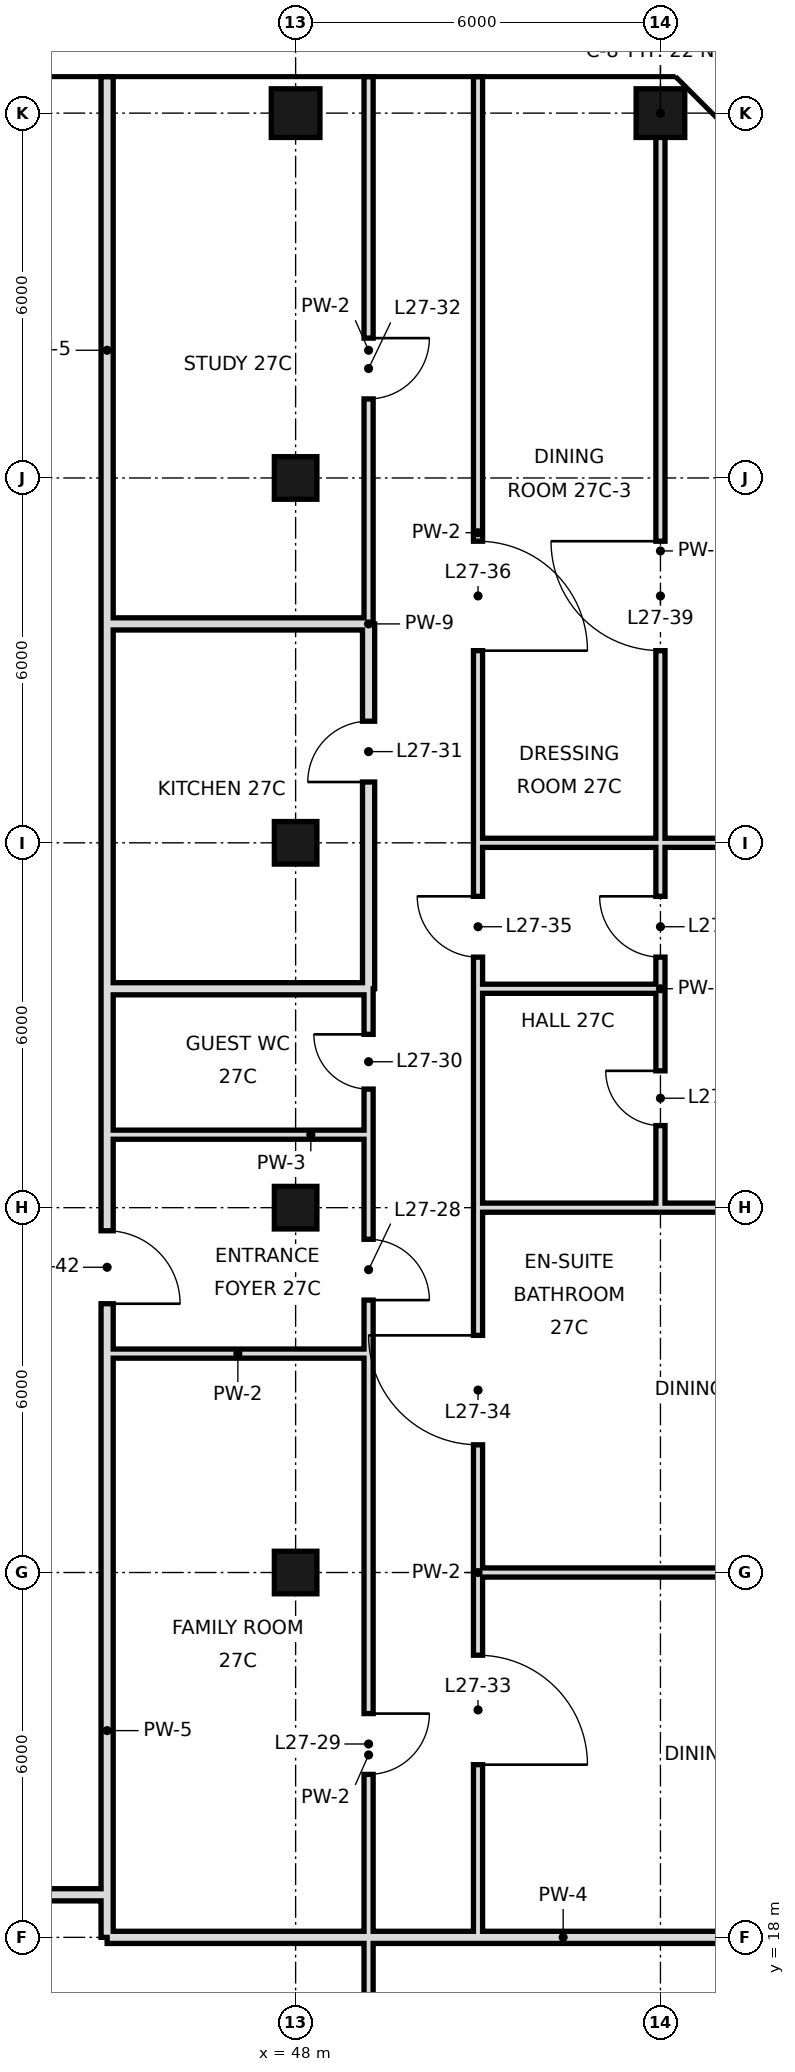
"""IFC4 building model, lengths in metres.
Left out: names, types, materials, properties, quantities, classifications, styles, units other than length and angle.
Written with IfcOpenShell. Run it as: python <this file> out.ifc"""

import sys

from ifc_helpers import new_model, si_unit, direction, frame, frame_2d, origin, origin_2d, place, context, subcontext, project, spatial, rectangle, hollow_rectangle, extrude, element, fill, save


model = new_model("IFC4")
c1 = context("Model", 3, precision=1e-05, world=origin(), true_north=direction((0.0, 1.0)))
c2 = subcontext(c1, "Body", "Model", "MODEL_VIEW")
j1 = project(units=[si_unit("LENGTHUNIT", "METRE"), si_unit("PLANEANGLEUNIT", "RADIAN")], contexts=[c1])
p1 = place(None, origin())
s1 = spatial("IfcSite", under=j1, at=p1, CompositionType="ELEMENT")
p2 = place(p1, origin())
s2 = spatial("IfcBuilding", under=s1, at=p2, CompositionType="ELEMENT")
p3 = place(p2, frame((0.0, 0.0, 123.2)))
s3 = spatial("IfcBuildingStorey", under=s2, at=p3, CompositionType="ELEMENT", Elevation=123.2)
for number, where, z_axis, x_axis in (
    (1, (48.0, 24.0, 0.0), (0.0, 0.0, 1.0), (1.0, 0.0, 0.0)),
    (2, (48.0, 30.0, 0.0), (0.0, 0.0, 1.0), (1.0, 0.0, 0.0)),
    (3, (48.0, 36.0, 0.0), (0.0, 0.0, 1.0), (1.0, 0.0, 0.0)),
    (4, (48.0, 42.0, 0.0), (0.0, 0.0, 1.0), (1.0, 0.0, 0.0)),
):
    element("IfcColumn", number, at=place(p3, frame(where, z_axis=z_axis, x_axis=x_axis)), inside=s3, PredefinedType="COLUMN", context=c2, shape_type="SweptSolid", body=[
        extrude(hollow_rectangle(XDim=0.7, YDim=0.7, WallThickness=0.036, at=origin_2d()), origin(), (0.0, 0.0, 1.0), 3.6),
    ])
for number, where, z_axis, x_axis in (
    (5, (48.0, 48.0, 0.0), (0.0, 0.0, 1.0), (1.0, 0.0, 0.0)),
    (6, (54.0, 48.0, 0.0), (0.0, 0.0, 1.0), (1.0, 0.0, 0.0)),
):
    element("IfcColumn", number, at=place(p3, frame(where, z_axis=z_axis, x_axis=x_axis)), inside=s3, PredefinedType="COLUMN", context=c2, shape_type="SweptSolid", body=[
        extrude(hollow_rectangle(XDim=0.8, YDim=0.8, WallThickness=0.04, at=origin_2d()), origin(), (0.0, 0.0, 1.0), 3.6),
    ])
p4 = place(p3, frame((44.9, 18.7, 0.0), z_axis=(0.0, 0.0, 1.0), x_axis=(0.0, 1.0, 0.0)))
e7 = element("IfcWall", 7, at=p4, inside=s3, PredefinedType="SOLIDWALL", context=c2, shape_type="SweptSolid", body=[
    extrude(rectangle(XDim=14.9, YDim=0.2, at=frame_2d((7.45, 0.0))), origin(), (0.0, 0.0, 1.0), 2.97),
])
p5 = place(p4, frame((9.72, 0.0, 0.0)))
e8 = element("IfcOpeningElement", 8, at=p5, cuts=e7, PredefinedType="OPENING", context=c2, shape_type="SweptSolid", body=[
    extrude(rectangle(XDim=1.2, YDim=2.4, at=frame_2d((0.6, 1.2))), frame((0.0, 0.11, 0.0), z_axis=(0.0, -1.0, 0.0), x_axis=(1.0, 0.0, 0.0)), (0.0, 0.0, 1.0), 0.22),
])
p6 = place(p3, frame((44.9, 39.6, 0.0), z_axis=(0.0, 0.0, 1.0), x_axis=(0.0, 1.0, 0.0)))
e9 = element("IfcWall", 9, at=p6, inside=s3, PredefinedType="SOLIDWALL", context=c2, shape_type="SweptSolid", body=[
    extrude(rectangle(XDim=9.0, YDim=0.2, at=frame_2d((4.5, 0.0))), origin(), (0.0, 0.0, 1.0), 2.72),
])
p7 = place(p3, frame((44.9, 33.6, 0.0), z_axis=(0.0, 0.0, 1.0), x_axis=(0.0, 1.0, 0.0)))
e10 = element("IfcWall", 10, at=p7, inside=s3, PredefinedType="SOLIDWALL", context=c2, shape_type="SweptSolid", body=[
    extrude(rectangle(XDim=6.0, YDim=0.2, at=frame_2d((3.0, 0.0))), origin(), (0.0, 0.0, 1.0), 3.42),
])
p8 = place(p3, frame((44.9, 18.0, 0.0), z_axis=(0.0, 0.0, 1.0), x_axis=(0.0, 1.0, 0.0)))
e11 = element("IfcWall", 11, at=p8, inside=s3, PredefinedType="SOLIDWALL", context=c2, shape_type="SweptSolid", body=[
    extrude(rectangle(XDim=0.7, YDim=0.2, at=frame_2d((0.35, 0.0))), origin(), (0.0, 0.0, 1.0), 2.97),
])
p9 = place(p3, frame((49.2, 33.6, 0.0), z_axis=(0.0, 0.0, 1.0), x_axis=(0.0, 1.0, 0.0)))
e12 = element("IfcWall", 12, at=p9, inside=s3, PredefinedType="SOLIDWALL", context=c2, shape_type="SweptSolid", body=[
    extrude(rectangle(XDim=6.0, YDim=0.2, at=frame_2d((3.0, 0.0))), origin(), (0.0, 0.0, 1.0), 2.72),
])
p10 = place(p9, frame((3.4, 0.0, 0.0)))
e13 = element("IfcOpeningElement", 13, at=p10, cuts=e12, PredefinedType="OPENING", context=c2, shape_type="SweptSolid", body=[
    extrude(rectangle(XDim=1.0, YDim=2.4, at=frame_2d((0.5, 1.2))), frame((0.0, 0.11, 0.0), z_axis=(0.0, -1.0, 0.0), x_axis=(1.0, 0.0, 0.0)), (0.0, 0.0, 1.0), 0.22),
])
p11 = place(p3, frame((49.2, 10.8, 0.0), z_axis=(0.0, 0.0, 1.0), x_axis=(0.0, 1.0, 0.0)))
e14 = element("IfcWall", 14, at=p11, inside=s3, PredefinedType="PARTITIONING", context=c2, shape_type="SweptSolid", body=[
    extrude(rectangle(XDim=20.4, YDim=0.15, at=frame_2d((10.2, 0.0))), origin(), (0.0, 0.0, 1.0), 3.42),
])
p12 = place(p11, frame((17.68, 0.0, 0.0)))
e15 = element("IfcOpeningElement", 15, at=p12, cuts=e14, PredefinedType="OPENING", context=c2, shape_type="SweptSolid", body=[
    extrude(rectangle(XDim=1.0, YDim=2.4, at=frame_2d((0.5, 1.2))), frame((0.0, 0.085, 0.0), z_axis=(0.0, -1.0, 0.0), x_axis=(1.0, 0.0, 0.0)), (0.0, 0.0, 1.0), 0.17),
])
p13 = place(p11, frame((9.88, 0.0, 0.0)))
e16 = element("IfcOpeningElement", 16, at=p13, cuts=e14, PredefinedType="OPENING", context=c2, shape_type="SweptSolid", body=[
    extrude(rectangle(XDim=1.0, YDim=2.4, at=frame_2d((0.5, 1.2))), frame((0.0, 0.085, 0.0), z_axis=(0.0, -1.0, 0.0), x_axis=(1.0, 0.0, 0.0)), (0.0, 0.0, 1.0), 0.17),
])
p14 = place(p3, frame((49.2, 39.6, 0.0), z_axis=(0.0, 0.0, 1.0), x_axis=(0.0, 1.0, 0.0)))
e17 = element("IfcWall", 17, at=p14, inside=s3, PredefinedType="PARTITIONING", context=c2, shape_type="SweptSolid", body=[
    extrude(rectangle(XDim=9.0, YDim=0.15, at=frame_2d((4.5, 0.0))), origin(), (0.0, 0.0, 1.0), 3.42),
])
p15 = place(p14, frame((3.7, 0.0, 0.0)))
e18 = element("IfcOpeningElement", 18, at=p15, cuts=e17, PredefinedType="OPENING", context=c2, shape_type="SweptSolid", body=[
    extrude(rectangle(XDim=1.0, YDim=2.4, at=frame_2d((0.5, 1.2))), frame((0.0, 0.085, 0.0), z_axis=(0.0, -1.0, 0.0), x_axis=(1.0, 0.0, 0.0)), (0.0, 0.0, 1.0), 0.17),
])
p16 = place(p3, frame((49.2, 31.2, 0.0), z_axis=(0.0, 0.0, 1.0), x_axis=(0.0, 1.0, 0.0)))
e19 = element("IfcWall", 19, at=p16, inside=s3, PredefinedType="PARTITIONING", context=c2, shape_type="SweptSolid", body=[
    extrude(rectangle(XDim=2.4, YDim=0.15, at=frame_2d((1.2, 0.0))), origin(), (0.0, 0.0, 1.0), 3.42),
])
p17 = place(p16, frame((0.75, 0.0, 0.0)))
e20 = element("IfcOpeningElement", 20, at=p17, cuts=e19, PredefinedType="OPENING", context=c2, shape_type="SweptSolid", body=[
    extrude(rectangle(XDim=0.9, YDim=2.4, at=frame_2d((0.45, 1.2))), frame((0.0, 0.085, 0.0), z_axis=(0.0, -1.0, 0.0), x_axis=(1.0, 0.0, 0.0)), (0.0, 0.0, 1.0), 0.17),
])
p18 = place(p3, frame((51.0, 18.0, 0.0), z_axis=(0.0, 0.0, 1.0), x_axis=(0.0, 1.0, 0.0)))
e21 = element("IfcWall", 21, at=p18, inside=s3, PredefinedType="PARTITIONING", context=c2, shape_type="SweptSolid", body=[
    extrude(rectangle(XDim=12.0, YDim=0.15, at=frame_2d((6.0, 0.0))), origin(), (0.0, 0.0, 1.0), 3.42),
])
p19 = place(p18, frame((2.84, 0.0, 0.0)))
e22 = element("IfcOpeningElement", 22, at=p19, cuts=e21, PredefinedType="OPENING", context=c2, shape_type="SweptSolid", body=[
    extrude(rectangle(XDim=1.8, YDim=2.4, at=frame_2d((0.9, 1.2))), frame((0.0, 0.085, 0.0), z_axis=(0.0, -1.0, 0.0), x_axis=(1.0, 0.0, 0.0)), (0.0, 0.0, 1.0), 0.17),
])
p20 = place(p18, frame((8.1, 0.0, 0.0)))
e23 = element("IfcOpeningElement", 23, at=p20, cuts=e21, PredefinedType="OPENING", context=c2, shape_type="SweptSolid", body=[
    extrude(rectangle(XDim=1.8, YDim=2.4, at=frame_2d((0.9, 1.2))), frame((0.0, 0.085, 0.0), z_axis=(0.0, -1.0, 0.0), x_axis=(1.0, 0.0, 0.0)), (0.0, 0.0, 1.0), 0.17),
])
p21 = place(p3, frame((51.0, 33.6, 0.0), z_axis=(0.0, 0.0, 1.0), x_axis=(0.0, 1.0, 0.0)))
e24 = element("IfcWall", 24, at=p21, inside=s3, PredefinedType="PARTITIONING", context=c2, shape_type="SweptSolid", body=[
    extrude(rectangle(XDim=15.0, YDim=0.15, at=frame_2d((7.5, 0.0))), origin(), (0.0, 0.0, 1.0), 3.42),
])
p22 = place(p21, frame((0.52, 0.0, 0.0)))
e25 = element("IfcOpeningElement", 25, at=p22, cuts=e24, PredefinedType="OPENING", context=c2, shape_type="SweptSolid", body=[
    extrude(rectangle(XDim=1.0, YDim=2.4, at=frame_2d((0.5, 1.2))), frame((0.0, 0.085, 0.0), z_axis=(0.0, -1.0, 0.0), x_axis=(1.0, 0.0, 0.0)), (0.0, 0.0, 1.0), 0.17),
])
p23 = place(p21, frame((5.56, 0.0, 0.0)))
e26 = element("IfcOpeningElement", 26, at=p23, cuts=e24, PredefinedType="OPENING", context=c2, shape_type="SweptSolid", body=[
    extrude(rectangle(XDim=1.8, YDim=2.4, at=frame_2d((0.9, 1.2))), frame((0.0, 0.085, 0.0), z_axis=(0.0, -1.0, 0.0), x_axis=(1.0, 0.0, 0.0)), (0.0, 0.0, 1.0), 0.17),
])
p24 = place(p3, frame((51.0, 30.0, 0.0), z_axis=(0.0, 0.0, 1.0), x_axis=(0.0, 1.0, 0.0)))
e27 = element("IfcWall", 27, at=p24, inside=s3, PredefinedType="PARTITIONING", context=c2, shape_type="SweptSolid", body=[
    extrude(rectangle(XDim=3.6, YDim=0.15, at=frame_2d((1.8, 0.0))), origin(), (0.0, 0.0, 1.0), 3.42),
])
p25 = place(p3, frame((54.0, 33.6, 0.0), z_axis=(0.0, 0.0, 1.0), x_axis=(0.0, 1.0, 0.0)))
e28 = element("IfcWall", 28, at=p25, inside=s3, PredefinedType="PARTITIONING", context=c2, shape_type="SweptSolid", body=[
    extrude(rectangle(XDim=14.4, YDim=0.15, at=frame_2d((7.2, 0.0))), origin(), (0.0, 0.0, 1.0), 3.42),
])
p26 = place(p25, frame((0.52, 0.0, 0.0)))
e29 = element("IfcOpeningElement", 29, at=p26, cuts=e28, PredefinedType="OPENING", context=c2, shape_type="SweptSolid", body=[
    extrude(rectangle(XDim=1.0, YDim=2.4, at=frame_2d((0.5, 1.2))), frame((0.0, 0.085, 0.0), z_axis=(0.0, -1.0, 0.0), x_axis=(1.0, 0.0, 0.0)), (0.0, 0.0, 1.0), 0.17),
])
p27 = place(p25, frame((5.56, 0.0, 0.0)))
e30 = element("IfcOpeningElement", 30, at=p27, cuts=e28, PredefinedType="OPENING", context=c2, shape_type="SweptSolid", body=[
    extrude(rectangle(XDim=1.8, YDim=2.4, at=frame_2d((0.9, 1.2))), frame((0.0, 0.085, 0.0), z_axis=(0.0, -1.0, 0.0), x_axis=(1.0, 0.0, 0.0)), (0.0, 0.0, 1.0), 0.17),
])
p28 = place(p3, frame((54.0, 30.0, 0.0), z_axis=(0.0, 0.0, 1.0), x_axis=(0.0, 1.0, 0.0)))
e31 = element("IfcWall", 31, at=p28, inside=s3, PredefinedType="PARTITIONING", context=c2, shape_type="SweptSolid", body=[
    extrude(rectangle(XDim=3.6, YDim=0.15, at=frame_2d((1.8, 0.0))), origin(), (0.0, 0.0, 1.0), 3.42),
])
p29 = place(p28, frame((1.35, 0.0, 0.0)))
e32 = element("IfcOpeningElement", 32, at=p29, cuts=e31, PredefinedType="OPENING", context=c2, shape_type="SweptSolid", body=[
    extrude(rectangle(XDim=0.9, YDim=2.4, at=frame_2d((0.45, 1.2))), frame((0.0, 0.085, 0.0), z_axis=(0.0, -1.0, 0.0), x_axis=(1.0, 0.0, 0.0)), (0.0, 0.0, 1.0), 0.17),
])
p30 = place(p3, frame((44.9, 18.0, 0.0), z_axis=(0.0, 0.0, 1.0), x_axis=(1.0, 0.0, 0.0)))
e33 = element("IfcWall", 33, at=p30, inside=s3, PredefinedType="SOLIDWALL", context=c2, shape_type="SweptSolid", body=[
    extrude(rectangle(XDim=15.7, YDim=0.2, at=frame_2d((7.85, 0.0))), origin(), (0.0, 0.0, 1.0), 2.72),
])
p31 = place(p3, frame((35.4, 18.7, 0.0), z_axis=(0.0, 0.0, 1.0), x_axis=(1.0, 0.0, 0.0)))
e34 = element("IfcWall", 34, at=p31, inside=s3, PredefinedType="SOLIDWALL", context=c2, shape_type="SweptSolid", body=[
    extrude(rectangle(XDim=9.5, YDim=0.2, at=frame_2d((4.75, 0.0))), origin(), (0.0, 0.0, 1.0), 2.72),
])
p32 = place(p3, frame((51.0, 24.0, 0.0), z_axis=(0.0, 0.0, 1.0), x_axis=(1.0, 0.0, 0.0)))
e35 = element("IfcWall", 35, at=p32, inside=s3, PredefinedType="PARTITIONING", context=c2, shape_type="SweptSolid", body=[
    extrude(rectangle(XDim=9.0, YDim=0.15, at=frame_2d((4.5, 0.0))), origin(), (0.0, 0.0, 1.0), 2.72),
])
p33 = place(p3, frame((44.9, 27.6, 0.0), z_axis=(0.0, 0.0, 1.0), x_axis=(1.0, 0.0, 0.0)))
e36 = element("IfcWall", 36, at=p33, inside=s3, PredefinedType="PARTITIONING", context=c2, shape_type="SweptSolid", body=[
    extrude(rectangle(XDim=4.3, YDim=0.15, at=frame_2d((2.15, 0.0))), origin(), (0.0, 0.0, 1.0), 3.42),
])
p34 = place(p3, frame((54.0, 30.0, 0.0), z_axis=(0.0, 0.0, 1.0), x_axis=(1.0, 0.0, 0.0)))
e37 = element("IfcWall", 37, at=p34, inside=s3, PredefinedType="PARTITIONING", context=c2, shape_type="SweptSolid", body=[
    extrude(rectangle(XDim=6.6, YDim=0.15, at=frame_2d((3.3, 0.0))), origin(), (0.0, 0.0, 1.0), 2.72),
])
p35 = place(p3, frame((51.0, 30.0, 0.0), z_axis=(0.0, 0.0, 1.0), x_axis=(1.0, 0.0, 0.0)))
e38 = element("IfcWall", 38, at=p35, inside=s3, PredefinedType="PARTITIONING", context=c2, shape_type="SweptSolid", body=[
    extrude(rectangle(XDim=3.0, YDim=0.15, at=frame_2d((1.5, 0.0))), origin(), (0.0, 0.0, 1.0), 2.72),
])
p36 = place(p3, frame((44.9, 31.2, 0.0), z_axis=(0.0, 0.0, 1.0), x_axis=(1.0, 0.0, 0.0)))
e39 = element("IfcWall", 39, at=p36, inside=s3, PredefinedType="PARTITIONING", context=c2, shape_type="SweptSolid", body=[
    extrude(rectangle(XDim=4.3, YDim=0.15, at=frame_2d((2.15, 0.0))), origin(), (0.0, 0.0, 1.0), 3.42),
])
p37 = place(p3, frame((44.9, 33.6, 0.0), z_axis=(0.0, 0.0, 1.0), x_axis=(1.0, 0.0, 0.0)))
e40 = element("IfcWall", 40, at=p37, inside=s3, PredefinedType="SOLIDWALL", context=c2, shape_type="SweptSolid", body=[
    extrude(rectangle(XDim=4.3, YDim=0.2, at=frame_2d((2.15, 0.0))), origin(), (0.0, 0.0, 1.0), 2.97),
])
p38 = place(p3, frame((51.0, 33.6, 0.0), z_axis=(0.0, 0.0, 1.0), x_axis=(1.0, 0.0, 0.0)))
e41 = element("IfcWall", 41, at=p38, inside=s3, PredefinedType="PARTITIONING", context=c2, shape_type="SweptSolid", body=[
    extrude(rectangle(XDim=3.0, YDim=0.15, at=frame_2d((1.5, 0.0))), origin(), (0.0, 0.0, 1.0), 3.42),
])
p39 = place(p3, frame((51.0, 36.0, 0.0), z_axis=(0.0, 0.0, 1.0), x_axis=(1.0, 0.0, 0.0)))
e42 = element("IfcWall", 42, at=p39, inside=s3, PredefinedType="PARTITIONING", context=c2, shape_type="SweptSolid", body=[
    extrude(rectangle(XDim=9.0, YDim=0.15, at=frame_2d((4.5, 0.0))), origin(), (0.0, 0.0, 1.0), 2.72),
])
p40 = place(p3, frame((44.9, 39.6, 0.0), z_axis=(0.0, 0.0, 1.0), x_axis=(1.0, 0.0, 0.0)))
e43 = element("IfcWall", 43, at=p40, inside=s3, PredefinedType="SOLIDWALL", context=c2, shape_type="SweptSolid", body=[
    extrude(rectangle(XDim=4.3, YDim=0.2, at=frame_2d((2.15, 0.0))), origin(), (0.0, 0.0, 1.0), 2.97),
])
p41 = place(p12, frame((1.0, 0.0, 0.0), z_axis=(0.0, 0.0, 1.0), x_axis=(-1.0, 0.0, 0.0)))
e44 = element("IfcDoor", 44, at=p41, inside=s3, OperationType="SINGLE_SWING_RIGHT", PredefinedType="DOOR", context=c2, shape_type="SweptSolid", body=[
    extrude(rectangle(XDim=1.0, YDim=2.4, at=frame_2d((0.5, 1.2))), frame((0.0, 0.025, 0.0), z_axis=(0.0, -1.0, 0.0), x_axis=(1.0, 0.0, 0.0)), (0.0, 0.0, 1.0), 0.05),
])
fill(e15, e44)
p42 = place(p13, origin())
e45 = element("IfcDoor", 45, at=p42, inside=s3, OperationType="SINGLE_SWING_RIGHT", PredefinedType="DOOR", context=c2, shape_type="SweptSolid", body=[
    extrude(rectangle(XDim=1.0, YDim=2.4, at=frame_2d((0.5, 1.2))), frame((0.0, 0.025, 0.0), z_axis=(0.0, -1.0, 0.0), x_axis=(1.0, 0.0, 0.0)), (0.0, 0.0, 1.0), 0.05),
])
fill(e16, e45)
p43 = place(p17, frame((0.9, 0.0, 0.0), z_axis=(0.0, 0.0, 1.0), x_axis=(-1.0, 0.0, 0.0)))
e46 = element("IfcDoor", 46, at=p43, inside=s3, OperationType="SINGLE_SWING_LEFT", PredefinedType="DOOR", context=c2, shape_type="SweptSolid", body=[
    extrude(rectangle(XDim=0.9, YDim=2.4, at=frame_2d((0.45, 1.2))), frame((0.0, 0.025, 0.0), z_axis=(0.0, -1.0, 0.0), x_axis=(1.0, 0.0, 0.0)), (0.0, 0.0, 1.0), 0.05),
])
fill(e20, e46)
p44 = place(p10, origin())
e47 = element("IfcDoor", 47, at=p44, inside=s3, OperationType="SINGLE_SWING_LEFT", PredefinedType="DOOR", context=c2, shape_type="SweptSolid", body=[
    extrude(rectangle(XDim=1.0, YDim=2.4, at=frame_2d((0.5, 1.2))), frame((0.0, 0.025, 0.0), z_axis=(0.0, -1.0, 0.0), x_axis=(1.0, 0.0, 0.0)), (0.0, 0.0, 1.0), 0.05),
])
fill(e13, e47)
p45 = place(p15, origin())
e48 = element("IfcDoor", 48, at=p45, inside=s3, OperationType="SINGLE_SWING_RIGHT", PredefinedType="DOOR", context=c2, shape_type="SweptSolid", body=[
    extrude(rectangle(XDim=1.0, YDim=2.4, at=frame_2d((0.5, 1.2))), frame((0.0, 0.025, 0.0), z_axis=(0.0, -1.0, 0.0), x_axis=(1.0, 0.0, 0.0)), (0.0, 0.0, 1.0), 0.05),
])
fill(e18, e48)
p46 = place(p19, frame((1.8, 0.0, 0.0), z_axis=(0.0, 0.0, 1.0), x_axis=(-1.0, 0.0, 0.0)))
e49 = element("IfcDoor", 49, at=p46, inside=s3, OperationType="SINGLE_SWING_RIGHT", PredefinedType="DOOR", context=c2, shape_type="SweptSolid", body=[
    extrude(rectangle(XDim=1.8, YDim=2.4, at=frame_2d((0.9, 1.2))), frame((0.0, 0.025, 0.0), z_axis=(0.0, -1.0, 0.0), x_axis=(1.0, 0.0, 0.0)), (0.0, 0.0, 1.0), 0.05),
])
fill(e22, e49)
p47 = place(p20, frame((1.8, 0.0, 0.0), z_axis=(0.0, 0.0, 1.0), x_axis=(-1.0, 0.0, 0.0)))
e50 = element("IfcDoor", 50, at=p47, inside=s3, OperationType="SINGLE_SWING_LEFT", PredefinedType="DOOR", context=c2, shape_type="SweptSolid", body=[
    extrude(rectangle(XDim=1.8, YDim=2.4, at=frame_2d((0.9, 1.2))), frame((0.0, 0.025, 0.0), z_axis=(0.0, -1.0, 0.0), x_axis=(1.0, 0.0, 0.0)), (0.0, 0.0, 1.0), 0.05),
])
fill(e23, e50)
p48 = place(p22, frame((1.0, 0.0, 0.0), z_axis=(0.0, 0.0, 1.0), x_axis=(-1.0, 0.0, 0.0)))
e51 = element("IfcDoor", 51, at=p48, inside=s3, OperationType="SINGLE_SWING_LEFT", PredefinedType="DOOR", context=c2, shape_type="SweptSolid", body=[
    extrude(rectangle(XDim=1.0, YDim=2.4, at=frame_2d((0.5, 1.2))), frame((0.0, 0.025, 0.0), z_axis=(0.0, -1.0, 0.0), x_axis=(1.0, 0.0, 0.0)), (0.0, 0.0, 1.0), 0.05),
])
fill(e25, e51)
p49 = place(p23, frame((1.8, 0.0, 0.0), z_axis=(0.0, 0.0, 1.0), x_axis=(-1.0, 0.0, 0.0)))
e52 = element("IfcDoor", 52, at=p49, inside=s3, OperationType="SINGLE_SWING_RIGHT", PredefinedType="DOOR", context=c2, shape_type="SweptSolid", body=[
    extrude(rectangle(XDim=1.8, YDim=2.4, at=frame_2d((0.9, 1.2))), frame((0.0, 0.025, 0.0), z_axis=(0.0, -1.0, 0.0), x_axis=(1.0, 0.0, 0.0)), (0.0, 0.0, 1.0), 0.05),
])
fill(e26, e52)
p50 = place(p26, frame((1.0, 0.0, 0.0), z_axis=(0.0, 0.0, 1.0), x_axis=(-1.0, 0.0, 0.0)))
e53 = element("IfcDoor", 53, at=p50, inside=s3, OperationType="SINGLE_SWING_LEFT", PredefinedType="DOOR", context=c2, shape_type="SweptSolid", body=[
    extrude(rectangle(XDim=1.0, YDim=2.4, at=frame_2d((0.5, 1.2))), frame((0.0, 0.025, 0.0), z_axis=(0.0, -1.0, 0.0), x_axis=(1.0, 0.0, 0.0)), (0.0, 0.0, 1.0), 0.05),
])
fill(e29, e53)
p51 = place(p29, frame((0.9, 0.0, 0.0), z_axis=(0.0, 0.0, 1.0), x_axis=(-1.0, 0.0, 0.0)))
e54 = element("IfcDoor", 54, at=p51, inside=s3, OperationType="SINGLE_SWING_LEFT", PredefinedType="DOOR", context=c2, shape_type="SweptSolid", body=[
    extrude(rectangle(XDim=0.9, YDim=2.4, at=frame_2d((0.45, 1.2))), frame((0.0, 0.025, 0.0), z_axis=(0.0, -1.0, 0.0), x_axis=(1.0, 0.0, 0.0)), (0.0, 0.0, 1.0), 0.05),
])
fill(e32, e54)
p52 = place(p27, frame((1.8, 0.0, 0.0), z_axis=(0.0, 0.0, 1.0), x_axis=(-1.0, 0.0, 0.0)))
e55 = element("IfcDoor", 55, at=p52, inside=s3, OperationType="SINGLE_SWING_LEFT", PredefinedType="DOOR", context=c2, shape_type="SweptSolid", body=[
    extrude(rectangle(XDim=1.8, YDim=2.4, at=frame_2d((0.9, 1.2))), frame((0.0, 0.025, 0.0), z_axis=(0.0, -1.0, 0.0), x_axis=(1.0, 0.0, 0.0)), (0.0, 0.0, 1.0), 0.05),
])
fill(e30, e55)
p53 = place(p5, frame((1.2, 0.0, 0.0), z_axis=(0.0, 0.0, 1.0), x_axis=(-1.0, 0.0, 0.0)))
e56 = element("IfcDoor", 56, at=p53, inside=s3, OperationType="SINGLE_SWING_RIGHT", PredefinedType="DOOR", context=c2, shape_type="SweptSolid", body=[
    extrude(rectangle(XDim=1.2, YDim=2.4, at=frame_2d((0.6, 1.2))), frame((0.0, 0.025, 0.0), z_axis=(0.0, -1.0, 0.0), x_axis=(1.0, 0.0, 0.0)), (0.0, 0.0, 1.0), 0.05),
])
fill(e8, e56)
save(model, sys.argv[1])
